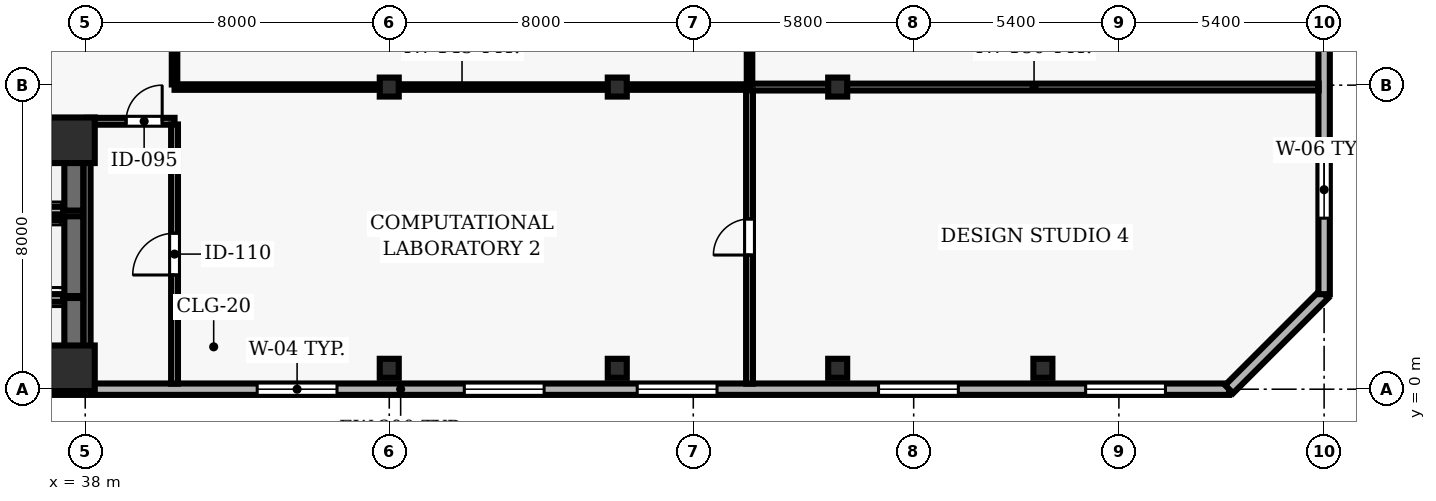
"""IFC4 building model, lengths in metres.
Left out: names, types, materials, properties, quantities, classifications, styles, units other than length and angle.
Written with IfcOpenShell. Run it as: python <this file> out.ifc"""

import sys

from ifc_helpers import new_model, si_unit, direction, frame, frame_2d, origin, origin_2d, place, context, subcontext, project, spatial, rectangle, hollow_rectangle, extrude, element, fill, save


model = new_model("IFC4")
c1 = context("Model", 3, precision=1e-05, world=origin(), true_north=direction((0.0, 1.0)))
c2 = subcontext(c1, "Body", "Model", "MODEL_VIEW")
j1 = project(units=[si_unit("LENGTHUNIT", "METRE"), si_unit("PLANEANGLEUNIT", "RADIAN")], contexts=[c1])
p1 = place(None, origin())
s1 = spatial("IfcSite", under=j1, at=p1, CompositionType="ELEMENT")
p2 = place(p1, origin())
s2 = spatial("IfcBuilding", under=s1, at=p2, CompositionType="ELEMENT")
p3 = place(p2, frame((0.0, 0.0, 115.1)))
s3 = spatial("IfcBuildingStorey", under=s2, at=p3, CompositionType="ELEMENT", Elevation=115.1)
for number, where, z_axis, x_axis in (
    (1, (37.65, 0.55, 0.0), (0.0, 0.0, 1.0), (1.0, 0.0, 0.0)),
    (2, (37.65, 6.55, 0.0), (0.0, 0.0, 1.0), (1.0, 0.0, 0.0)),
):
    element("IfcColumn", number, at=place(p3, frame(where, z_axis=z_axis, x_axis=x_axis)), inside=s3, PredefinedType="COLUMN", context=c2, shape_type="SweptSolid", body=[
        extrude(rectangle(XDim=1.2, YDim=1.2, at=origin_2d()), origin(), (0.0, 0.0, 1.0), 3.9),
    ])
for number, where, z_axis, x_axis in (
    (3, (46.0, 0.55, 0.0), (0.0, 0.0, 1.0), (1.0, 0.0, 0.0)),
    (4, (46.0, 7.95, 0.0), (0.0, 0.0, 1.0), (1.0, 0.0, 0.0)),
    (5, (52.0, 0.55, 0.0), (0.0, 0.0, 1.0), (1.0, 0.0, 0.0)),
    (6, (52.0, 7.95, 0.0), (0.0, 0.0, 1.0), (1.0, 0.0, 0.0)),
    (7, (57.8, 0.55, 0.0), (0.0, 0.0, 1.0), (1.0, 0.0, 0.0)),
    (8, (57.8, 7.95, 0.0), (0.0, 0.0, 1.0), (1.0, 0.0, 0.0)),
    (9, (63.2, 0.55, 0.0), (0.0, 0.0, 1.0), (1.0, 0.0, 0.0)),
):
    element("IfcColumn", number, at=place(p3, frame(where, z_axis=z_axis, x_axis=x_axis)), inside=s3, PredefinedType="COLUMN", context=c2, shape_type="SweptSolid", body=[
        extrude(hollow_rectangle(XDim=0.5, YDim=0.5, WallThickness=0.025, at=origin_2d()), origin(), (0.0, 0.0, 1.0), 3.9),
    ])
p4 = place(p3, frame((24.5, 0.0, 0.0), z_axis=(0.0, 0.0, 1.0), x_axis=(1.0, 0.0, 0.0)))
e10 = element("IfcWall", 10, at=p4, inside=s3, PredefinedType="SOLIDWALL", context=c2, shape_type="SweptSolid", body=[
    extrude(rectangle(XDim=43.6, YDim=0.3, at=frame_2d((21.8, 0.0))), origin(), (0.0, 0.0, 1.0), 3.69),
])
p5 = place(p4, frame((1.675, 0.0, 0.9)))
e11 = element("IfcOpeningElement", 11, at=p5, cuts=e10, PredefinedType="OPENING", context=c2, shape_type="SweptSolid", body=[
    extrude(rectangle(XDim=2.1, YDim=1.6, at=frame_2d((1.05, 0.8))), frame((0.0, 0.16, 0.0), z_axis=(0.0, -1.0, 0.0), x_axis=(1.0, 0.0, 0.0)), (0.0, 0.0, 1.0), 0.32),
])
p6 = place(p4, frame((18.025, 0.0, 0.9)))
e12 = element("IfcOpeningElement", 12, at=p6, cuts=e10, PredefinedType="OPENING", context=c2, shape_type="SweptSolid", body=[
    extrude(rectangle(XDim=2.1, YDim=1.6, at=frame_2d((1.05, 0.8))), frame((0.0, 0.16, 0.0), z_axis=(0.0, -1.0, 0.0), x_axis=(1.0, 0.0, 0.0)), (0.0, 0.0, 1.0), 0.32),
])
p7 = place(p4, frame((23.475, 0.0, 0.9)))
e13 = element("IfcOpeningElement", 13, at=p7, cuts=e10, PredefinedType="OPENING", context=c2, shape_type="SweptSolid", body=[
    extrude(rectangle(XDim=2.1, YDim=1.6, at=frame_2d((1.05, 0.8))), frame((0.0, 0.16, 0.0), z_axis=(0.0, -1.0, 0.0), x_axis=(1.0, 0.0, 0.0)), (0.0, 0.0, 1.0), 0.32),
])
p8 = place(p4, frame((28.025, 0.0, 0.9)))
e14 = element("IfcOpeningElement", 14, at=p8, cuts=e10, PredefinedType="OPENING", context=c2, shape_type="SweptSolid", body=[
    extrude(rectangle(XDim=2.1, YDim=1.6, at=frame_2d((1.05, 0.8))), frame((0.0, 0.16, 0.0), z_axis=(0.0, -1.0, 0.0), x_axis=(1.0, 0.0, 0.0)), (0.0, 0.0, 1.0), 0.32),
])
p9 = place(p4, frame((34.375, 0.0, 0.9)))
e15 = element("IfcOpeningElement", 15, at=p9, cuts=e10, PredefinedType="OPENING", context=c2, shape_type="SweptSolid", body=[
    extrude(rectangle(XDim=2.1, YDim=1.6, at=frame_2d((1.05, 0.8))), frame((0.0, 0.16, 0.0), z_axis=(0.0, -1.0, 0.0), x_axis=(1.0, 0.0, 0.0)), (0.0, 0.0, 1.0), 0.32),
])
p10 = place(p4, frame((39.825, 0.0, 0.9)))
e16 = element("IfcOpeningElement", 16, at=p10, cuts=e10, PredefinedType="OPENING", context=c2, shape_type="SweptSolid", body=[
    extrude(rectangle(XDim=2.1, YDim=1.6, at=frame_2d((1.05, 0.8))), frame((0.0, 0.16, 0.0), z_axis=(0.0, -1.0, 0.0), x_axis=(1.0, 0.0, 0.0)), (0.0, 0.0, 1.0), 0.32),
])
p11 = place(p3, frame((68.1, 0.0, 0.0), z_axis=(0.0, 0.0, 1.0), x_axis=(0.707106781187, 0.707106781187, 0.0)))
e17 = element("IfcWall", 17, at=p11, inside=s3, PredefinedType="SOLIDWALL", context=c2, shape_type="SweptSolid", body=[
    extrude(rectangle(XDim=3.536, YDim=0.3, at=frame_2d((1.768, 0.0))), origin(), (0.0, 0.0, 1.0), 3.69),
])
p12 = place(p3, frame((70.6, 2.5, 0.0), z_axis=(0.0, 0.0, 1.0), x_axis=(0.0, 1.0, 0.0)))
e18 = element("IfcWall", 18, at=p12, inside=s3, PredefinedType="SOLIDWALL", context=c2, shape_type="SweptSolid", body=[
    extrude(rectangle(XDim=11.0, YDim=0.3, at=frame_2d((5.5, 0.0))), origin(), (0.0, 0.0, 1.0), 3.69),
])
p13 = place(p12, frame((2.0, 0.0, 0.9)))
e19 = element("IfcOpeningElement", 19, at=p13, cuts=e18, PredefinedType="OPENING", context=c2, shape_type="SweptSolid", body=[
    extrude(rectangle(XDim=1.5, YDim=1.8, at=frame_2d((0.75, 0.9))), frame((0.0, 0.16, 0.0), z_axis=(0.0, -1.0, 0.0), x_axis=(1.0, 0.0, 0.0)), (0.0, 0.0, 1.0), 0.32),
])
p14 = place(p12, frame((7.5, 0.0, 0.9)))
e20 = element("IfcOpeningElement", 20, at=p14, cuts=e18, PredefinedType="OPENING", context=c2, shape_type="SweptSolid", body=[
    extrude(rectangle(XDim=1.5, YDim=1.8, at=frame_2d((0.75, 0.9))), frame((0.0, 0.16, 0.0), z_axis=(0.0, -1.0, 0.0), x_axis=(1.0, 0.0, 0.0)), (0.0, 0.0, 1.0), 0.32),
])
p15 = place(p3, frame((37.7, 0.3, 0.0), z_axis=(0.0, 0.0, 1.0), x_axis=(0.0, 1.0, 0.0)))
e21 = element("IfcWall", 21, at=p15, inside=s3, PredefinedType="SHEAR", context=c2, shape_type="SweptSolid", body=[
    extrude(rectangle(XDim=2.1, YDim=0.5, at=frame_2d((1.05, 0.0))), origin(), (0.0, 0.0, 1.0), 3.69),
])
for number, where, z_axis, x_axis in (
    (22, (35.28, 0.3, 0.0), (0.0, 0.0, 1.0), (1.0, 0.0, 0.0)),
    (23, (37.42, 2.4, 0.0), (0.0, 0.0, 1.0), (-1.0, 0.0, 0.0)),
):
    element("IfcWall", number, at=place(p3, frame(where, z_axis=z_axis, x_axis=x_axis)), inside=s3, PredefinedType="SOLIDWALL", context=c2, shape_type="SweptSolid", body=[
        extrude(rectangle(XDim=2.14, YDim=0.2, at=frame_2d((1.07, 0.0))), origin(), (0.0, 0.0, 1.0), 3.69),
    ])
p16 = place(p3, frame((37.7, 2.45, 0.0), z_axis=(0.0, 0.0, 1.0), x_axis=(0.0, 1.0, 0.0)))
e24 = element("IfcWall", 24, at=p16, inside=s3, PredefinedType="SHEAR", context=c2, shape_type="SweptSolid", body=[
    extrude(rectangle(XDim=2.1, YDim=0.5, at=frame_2d((1.05, 0.0))), origin(), (0.0, 0.0, 1.0), 3.69),
])
p17 = place(p3, frame((37.42, 4.55, 0.0), z_axis=(0.0, 0.0, 1.0), x_axis=(-1.0, 0.0, 0.0)))
e25 = element("IfcWall", 25, at=p17, inside=s3, PredefinedType="SOLIDWALL", context=c2, shape_type="SweptSolid", body=[
    extrude(rectangle(XDim=2.14, YDim=0.2, at=frame_2d((1.07, 0.0))), origin(), (0.0, 0.0, 1.0), 3.69),
])
p18 = place(p3, frame((37.7, 4.7, 0.0), z_axis=(0.0, 0.0, 1.0), x_axis=(0.0, 1.0, 0.0)))
e26 = element("IfcWall", 26, at=p18, inside=s3, PredefinedType="SHEAR", context=c2, shape_type="SweptSolid", body=[
    extrude(rectangle(XDim=2.25, YDim=0.5, at=frame_2d((1.125, 0.0))), origin(), (0.0, 0.0, 1.0), 3.69),
])
for number, where, z_axis, x_axis in (
    (27, (35.28, 4.7, 0.0), (0.0, 0.0, 1.0), (1.0, 0.0, 0.0)),
    (28, (37.42, 6.95, 0.0), (0.0, 0.0, 1.0), (-1.0, 0.0, 0.0)),
):
    element("IfcWall", number, at=place(p3, frame(where, z_axis=z_axis, x_axis=x_axis)), inside=s3, PredefinedType="SOLIDWALL", context=c2, shape_type="SweptSolid", body=[
        extrude(rectangle(XDim=2.14, YDim=0.2, at=frame_2d((1.07, 0.0))), origin(), (0.0, 0.0, 1.0), 3.69),
    ])
p19 = place(p3, frame((38.05, 7.05, 0.0), z_axis=(0.0, 0.0, 1.0), x_axis=(1.0, 0.0, 0.0)))
e29 = element("IfcWall", 29, at=p19, inside=s3, PredefinedType="PARTITIONING", context=c2, shape_type="SweptSolid", body=[
    extrude(rectangle(XDim=2.3, YDim=0.18, at=frame_2d((1.15, 0.0))), origin(), (0.0, 0.0, 1.0), 3.69),
])
p20 = place(p19, frame((1.025, 0.0, 0.0)))
e30 = element("IfcOpeningElement", 30, at=p20, cuts=e29, PredefinedType="OPENING", context=c2, shape_type="SweptSolid", body=[
    extrude(rectangle(XDim=0.95, YDim=2.1, at=frame_2d((0.475, 1.05))), frame((0.0, 0.1, 0.0), z_axis=(0.0, -1.0, 0.0), x_axis=(1.0, 0.0, 0.0)), (0.0, 0.0, 1.0), 0.2),
])
p21 = place(p3, frame((55.48, 7.95, 0.0), z_axis=(0.0, 0.0, 1.0), x_axis=(-1.0, 0.0, 0.0)))
e31 = element("IfcWall", 31, at=p21, inside=s3, PredefinedType="PARTITIONING", context=c2, shape_type="SweptSolid", body=[
    extrude(rectangle(XDim=15.13, YDim=0.145, at=frame_2d((7.565, 0.0))), origin(), (0.0, 0.0, 1.0), 3.073),
])
p22 = place(p3, frame((70.455, 7.95, 0.0), z_axis=(0.0, 0.0, 1.0), x_axis=(-1.0, 0.0, 0.0)))
e32 = element("IfcWall", 32, at=p22, inside=s3, PredefinedType="PARTITIONING", context=c2, shape_type="SweptSolid", body=[
    extrude(rectangle(XDim=14.975, YDim=0.18, at=frame_2d((7.488, 0.0))), origin(), (0.0, 0.0, 1.0), 3.073),
])
p23 = place(p3, frame((38.05, 6.965, 0.0), z_axis=(0.0, 0.0, 1.0), x_axis=(0.0, -1.0, 0.0)))
e33 = element("IfcWall", 33, at=p23, inside=s3, PredefinedType="PARTITIONING", context=c2, shape_type="SweptSolid", body=[
    extrude(rectangle(XDim=6.82, YDim=0.18, at=frame_2d((3.41, 0.0))), origin(), (0.0, 0.0, 1.0), 3.073),
])
p24 = place(p3, frame((40.35, 0.145, 0.0), z_axis=(0.0, 0.0, 1.0), x_axis=(0.0, 1.0, 0.0)))
e34 = element("IfcWall", 34, at=p24, inside=s3, PredefinedType="PARTITIONING", context=c2, shape_type="SweptSolid", body=[
    extrude(rectangle(XDim=6.82, YDim=0.18, at=frame_2d((3.41, 0.0))), origin(), (0.0, 0.0, 1.0), 3.69),
])
p25 = place(p24, frame((2.86, 0.0, 0.0)))
e35 = element("IfcOpeningElement", 35, at=p25, cuts=e34, PredefinedType="OPENING", context=c2, shape_type="SweptSolid", body=[
    extrude(rectangle(XDim=1.1, YDim=2.15, at=frame_2d((0.55, 1.075))), frame((0.0, 0.1, 0.0), z_axis=(0.0, -1.0, 0.0), x_axis=(1.0, 0.0, 0.0)), (0.0, 0.0, 1.0), 0.2),
])
p26 = place(p3, frame((40.35, 8.018, 0.0), z_axis=(0.0, 0.0, 1.0), x_axis=(0.0, 1.0, 0.0)))
e36 = element("IfcWall", 36, at=p26, inside=s3, PredefinedType="PARTITIONING", context=c2, shape_type="SweptSolid", body=[
    extrude(rectangle(XDim=5.564, YDim=0.145, at=frame_2d((2.782, 0.0))), origin(), (0.0, 0.0, 1.0), 3.69),
])
p27 = place(p3, frame((55.48, 0.145, 0.0), z_axis=(0.0, 0.0, 1.0), x_axis=(0.0, 1.0, 0.0)))
e37 = element("IfcWall", 37, at=p27, inside=s3, PredefinedType="PARTITIONING", context=c2, shape_type="SweptSolid", body=[
    extrude(rectangle(XDim=7.72, YDim=0.18, at=frame_2d((3.86, 0.0))), origin(), (0.0, 0.0, 1.0), 3.69),
])
p28 = place(p27, frame((3.385, 0.0, 0.0)))
e38 = element("IfcOpeningElement", 38, at=p28, cuts=e37, PredefinedType="OPENING", context=c2, shape_type="SweptSolid", body=[
    extrude(rectangle(XDim=0.95, YDim=2.1, at=frame_2d((0.475, 1.05))), frame((0.0, 0.1, 0.0), z_axis=(0.0, -1.0, 0.0), x_axis=(1.0, 0.0, 0.0)), (0.0, 0.0, 1.0), 0.2),
])
p29 = place(p3, frame((55.48, 8.035, 0.0), z_axis=(0.0, 0.0, 1.0), x_axis=(0.0, 1.0, 0.0)))
e39 = element("IfcWall", 39, at=p29, inside=s3, PredefinedType="PARTITIONING", context=c2, shape_type="SweptSolid", body=[
    extrude(rectangle(XDim=5.54, YDim=0.145, at=frame_2d((2.77, 0.0))), origin(), (0.0, 0.0, 1.0), 3.69),
])
p30 = place(p6, origin())
e40 = element("IfcWindow", 40, at=p30, inside=s3, PartitioningType="SINGLE_PANEL", PredefinedType="WINDOW", context=c2, shape_type="SweptSolid", body=[
    extrude(rectangle(XDim=2.1, YDim=1.6, at=frame_2d((1.05, 0.8))), frame((0.0, 0.03, 0.0), z_axis=(0.0, -1.0, 0.0), x_axis=(1.0, 0.0, 0.0)), (0.0, 0.0, 1.0), 0.06),
])
fill(e12, e40)
p31 = place(p7, origin())
e41 = element("IfcWindow", 41, at=p31, inside=s3, PartitioningType="SINGLE_PANEL", PredefinedType="WINDOW", context=c2, shape_type="SweptSolid", body=[
    extrude(rectangle(XDim=2.1, YDim=1.6, at=frame_2d((1.05, 0.8))), frame((0.0, 0.03, 0.0), z_axis=(0.0, -1.0, 0.0), x_axis=(1.0, 0.0, 0.0)), (0.0, 0.0, 1.0), 0.06),
])
fill(e13, e41)
p32 = place(p8, origin())
e42 = element("IfcWindow", 42, at=p32, inside=s3, PartitioningType="SINGLE_PANEL", PredefinedType="WINDOW", context=c2, shape_type="SweptSolid", body=[
    extrude(rectangle(XDim=2.1, YDim=1.6, at=frame_2d((1.05, 0.8))), frame((0.0, 0.03, 0.0), z_axis=(0.0, -1.0, 0.0), x_axis=(1.0, 0.0, 0.0)), (0.0, 0.0, 1.0), 0.06),
])
fill(e14, e42)
p33 = place(p9, origin())
e43 = element("IfcWindow", 43, at=p33, inside=s3, PartitioningType="SINGLE_PANEL", PredefinedType="WINDOW", context=c2, shape_type="SweptSolid", body=[
    extrude(rectangle(XDim=2.1, YDim=1.6, at=frame_2d((1.05, 0.8))), frame((0.0, 0.03, 0.0), z_axis=(0.0, -1.0, 0.0), x_axis=(1.0, 0.0, 0.0)), (0.0, 0.0, 1.0), 0.06),
])
fill(e15, e43)
p34 = place(p10, origin())
e44 = element("IfcWindow", 44, at=p34, inside=s3, PartitioningType="SINGLE_PANEL", PredefinedType="WINDOW", context=c2, shape_type="SweptSolid", body=[
    extrude(rectangle(XDim=2.1, YDim=1.6, at=frame_2d((1.05, 0.8))), frame((0.0, 0.03, 0.0), z_axis=(0.0, -1.0, 0.0), x_axis=(1.0, 0.0, 0.0)), (0.0, 0.0, 1.0), 0.06),
])
fill(e16, e44)
p35 = place(p13, origin())
e45 = element("IfcWindow", 45, at=p35, inside=s3, PartitioningType="SINGLE_PANEL", PredefinedType="WINDOW", context=c2, shape_type="SweptSolid", body=[
    extrude(rectangle(XDim=1.5, YDim=1.8, at=frame_2d((0.75, 0.9))), frame((0.0, 0.03, 0.0), z_axis=(0.0, -1.0, 0.0), x_axis=(1.0, 0.0, 0.0)), (0.0, 0.0, 1.0), 0.06),
])
fill(e19, e45)
p36 = place(p20, origin())
e46 = element("IfcDoor", 46, at=p36, inside=s3, OperationType="SINGLE_SWING_RIGHT", PredefinedType="DOOR", context=c2, shape_type="SweptSolid", body=[
    extrude(rectangle(XDim=0.95, YDim=2.1, at=frame_2d((0.475, 1.05))), frame((0.0, 0.025, 0.0), z_axis=(0.0, -1.0, 0.0), x_axis=(1.0, 0.0, 0.0)), (0.0, 0.0, 1.0), 0.05),
])
fill(e30, e46)
p37 = place(p25, origin())
e47 = element("IfcDoor", 47, at=p37, inside=s3, OperationType="SINGLE_SWING_LEFT", PredefinedType="DOOR", context=c2, shape_type="SweptSolid", body=[
    extrude(rectangle(XDim=1.1, YDim=2.15, at=frame_2d((0.55, 1.075))), frame((0.0, 0.025, 0.0), z_axis=(0.0, -1.0, 0.0), x_axis=(1.0, 0.0, 0.0)), (0.0, 0.0, 1.0), 0.05),
])
fill(e35, e47)
p38 = place(p28, origin())
e48 = element("IfcDoor", 48, at=p38, inside=s3, OperationType="SINGLE_SWING_LEFT", PredefinedType="DOOR", context=c2, shape_type="SweptSolid", body=[
    extrude(rectangle(XDim=0.95, YDim=2.1, at=frame_2d((0.475, 1.05))), frame((0.0, 0.025, 0.0), z_axis=(0.0, -1.0, 0.0), x_axis=(1.0, 0.0, 0.0)), (0.0, 0.0, 1.0), 0.05),
])
fill(e38, e48)
save(model, sys.argv[1])
